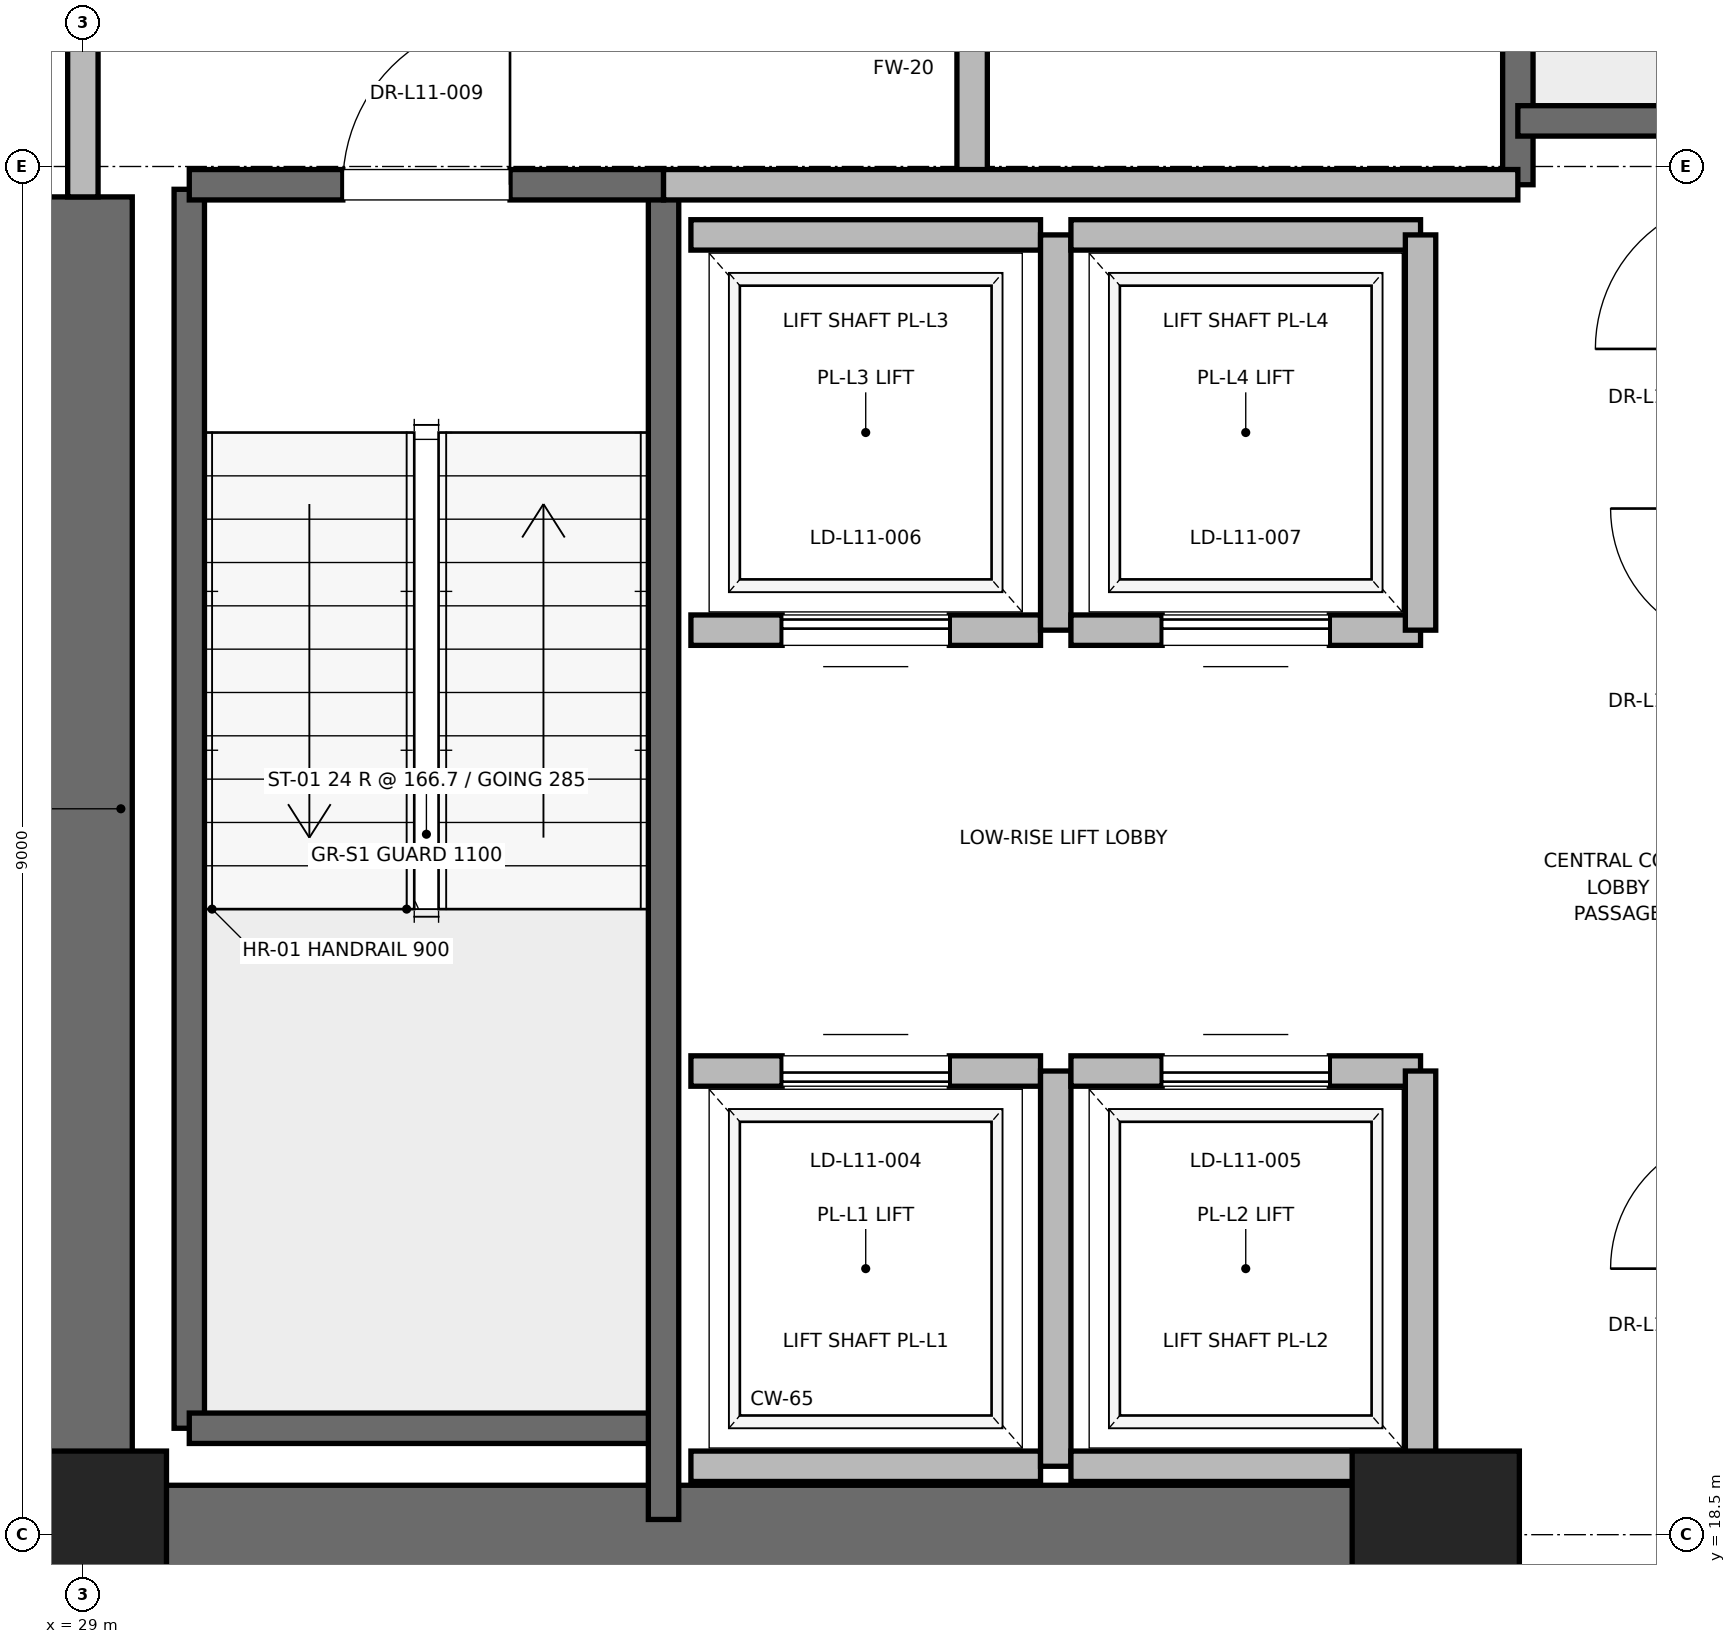
"""IFC4 building model, lengths in metres.
Left out: names, types, materials, properties, quantities, classifications, styles, units other than length and angle.
Written with IfcOpenShell. Run it as: python <this file> out.ifc"""

import sys

from ifc_helpers import new_model, si_unit, direction, frame, frame_2d, origin, origin_2d, place, context, subcontext, project, spatial, rectangle, extrude, element, fill, save


model = new_model("IFC4")
c1 = context("Model", 3, precision=1e-05, world=origin(), true_north=direction((0.0, 1.0)))
c2 = subcontext(c1, "Body", "Model", "MODEL_VIEW")
j1 = project(units=[si_unit("LENGTHUNIT", "METRE"), si_unit("PLANEANGLEUNIT", "RADIAN")], contexts=[c1])
p1 = place(None, origin())
s1 = spatial("IfcSite", under=j1, at=p1, CompositionType="ELEMENT")
p2 = place(p1, origin())
s2 = spatial("IfcBuilding", under=s1, at=p2, CompositionType="ELEMENT")
p3 = place(p2, frame((0.0, 0.0, 51.6)))
s3 = spatial("IfcBuildingStorey", under=s2, at=p3, CompositionType="ELEMENT", Elevation=51.6)
for number, where, z_axis, x_axis in (
    (1, (29.0, 18.5, 0.0), (0.0, 0.0, 1.0), (1.0, 0.0, 0.0)),
    (2, (37.9, 18.5, 0.0), (0.0, 0.0, 1.0), (1.0, 0.0, 0.0)),
):
    element("IfcColumn", number, at=place(p3, frame(where, z_axis=z_axis, x_axis=x_axis)), inside=s3, PredefinedType="PILASTER", context=c2, shape_type="SweptSolid", body=[
        extrude(rectangle(XDim=1.1, YDim=1.1, at=origin_2d()), origin(), (0.0, 0.0, 1.0), 4.0),
    ])
p4 = place(p3, frame((29.0, 18.5, 0.0), z_axis=(0.0, 0.0, 1.0), x_axis=(1.0, 0.0, 0.0)))
e3 = element("IfcWall", 3, at=p4, inside=s3, PredefinedType="SHEAR", context=c2, shape_type="SweptSolid", body=[
    extrude(rectangle(XDim=9.2, YDim=0.65, at=frame_2d((4.6, 0.0))), origin(), (0.0, 0.0, 1.0), 3.76),
])
p5 = place(p3, frame((29.0, 18.5, 0.0), z_axis=(0.0, 0.0, 1.0), x_axis=(0.0, 1.0, 0.0)))
e4 = element("IfcWall", 4, at=p5, inside=s3, PredefinedType="SHEAR", context=c2, shape_type="SweptSolid", body=[
    extrude(rectangle(XDim=8.8, YDim=0.65, at=frame_2d((4.4, 0.0))), origin(), (0.0, 0.0, 1.0), 3.76),
])
p6 = place(p3, frame((29.7, 19.2, 0.0), z_axis=(0.0, 0.0, 1.0), x_axis=(0.0, 1.0, 0.0)))
e5 = element("IfcWall", 5, at=p6, inside=s3, PredefinedType="SOLIDWALL", context=c2, shape_type="SweptSolid", body=[
    extrude(rectangle(XDim=8.15, YDim=0.2, at=frame_2d((4.075, 0.0))), origin(), (0.0, 0.0, 1.0), 3.76),
])
p7 = place(p3, frame((29.7, 19.2, 0.0), z_axis=(0.0, 0.0, 1.0), x_axis=(1.0, 0.0, 0.0)))
e6 = element("IfcWall", 6, at=p7, inside=s3, PredefinedType="SOLIDWALL", context=c2, shape_type="SweptSolid", body=[
    extrude(rectangle(XDim=3.12, YDim=0.2, at=frame_2d((1.56, 0.0))), origin(), (0.0, 0.0, 1.0), 3.76),
])
p8 = place(p3, frame((32.82, 18.6, 0.0), z_axis=(0.0, 0.0, 1.0), x_axis=(0.0, 1.0, 0.0)))
e7 = element("IfcWall", 7, at=p8, inside=s3, PredefinedType="SOLIDWALL", context=c2, shape_type="SweptSolid", body=[
    extrude(rectangle(XDim=8.78, YDim=0.2, at=frame_2d((4.39, 0.0))), origin(), (0.0, 0.0, 1.0), 3.76),
])
p9 = place(p3, frame((29.7, 27.38, 0.0), z_axis=(0.0, 0.0, 1.0), x_axis=(1.0, 0.0, 0.0)))
e8 = element("IfcWall", 8, at=p9, inside=s3, PredefinedType="SOLIDWALL", context=c2, shape_type="SweptSolid", body=[
    extrude(rectangle(XDim=3.12, YDim=0.2, at=frame_2d((1.56, 0.0))), origin(), (0.0, 0.0, 1.0), 3.76),
])
p10 = place(p9, frame((1.01, 0.0, 0.0)))
e9 = element("IfcOpeningElement", 9, at=p10, cuts=e8, PredefinedType="OPENING", context=c2, shape_type="SweptSolid", body=[
    extrude(rectangle(XDim=1.1, YDim=2.15, at=frame_2d((0.55, 1.075))), frame((0.0, 0.1, 0.0), z_axis=(0.0, -1.0, 0.0), x_axis=(1.0, 0.0, 0.0)), (0.0, 0.0, 1.0), 0.2),
])
p11 = place(p3, frame((38.44, 27.38, 0.0), z_axis=(0.0, 0.0, 1.0), x_axis=(0.0, 1.0, 0.0)))
e10 = element("IfcWall", 10, at=p11, inside=s3, PredefinedType="SOLIDWALL", context=c2, shape_type="SweptSolid", body=[
    extrude(rectangle(XDim=8.87, YDim=0.2, at=frame_2d((4.435, 0.0))), origin(), (0.0, 0.0, 1.0), 3.76),
])
p12 = place(p3, frame((38.44, 27.8, 0.0), z_axis=(0.0, 0.0, 1.0), x_axis=(1.0, 0.0, 0.0)))
e11 = element("IfcWall", 11, at=p12, inside=s3, PredefinedType="SOLIDWALL", context=c2, shape_type="SweptSolid", body=[
    extrude(rectangle(XDim=3.32, YDim=0.2, at=frame_2d((1.66, 0.0))), origin(), (0.0, 0.0, 1.0), 3.76),
])
p13 = place(p3, frame((34.85, 27.38, 0.0), z_axis=(0.0, 0.0, 1.0), x_axis=(0.0, 1.0, 0.0)))
e12 = element("IfcWall", 12, at=p13, inside=s3, PredefinedType="PARTITIONING", context=c2, shape_type="SweptSolid", body=[
    extrude(rectangle(XDim=3.37, YDim=0.2, at=frame_2d((1.685, 0.0))), origin(), (0.0, 0.0, 1.0), 3.76),
])
p14 = place(p13, frame((1.11, 0.0, 0.0)))
e13 = element("IfcOpeningElement", 13, at=p14, cuts=e12, PredefinedType="OPENING", context=c2, shape_type="SweptSolid", body=[
    extrude(rectangle(XDim=1.15, YDim=2.2, at=frame_2d((0.575, 1.1))), frame((0.0, 0.1, 0.0), z_axis=(0.0, -1.0, 0.0), x_axis=(1.0, 0.0, 0.0)), (0.0, 0.0, 1.0), 0.2),
])
p15 = place(p3, frame((29.0, 27.3, 0.0), z_axis=(0.0, 0.0, 1.0), x_axis=(0.0, 1.0, 0.0)))
e14 = element("IfcWall", 14, at=p15, inside=s3, PredefinedType="PARTITIONING", context=c2, shape_type="SweptSolid", body=[
    extrude(rectangle(XDim=3.4, YDim=0.2, at=frame_2d((1.7, 0.0))), origin(), (0.0, 0.0, 1.0), 2.54),
])
p16 = place(p15, frame((1.125, 0.0, 0.0)))
e15 = element("IfcOpeningElement", 15, at=p16, cuts=e14, PredefinedType="OPENING", context=c2, shape_type="SweptSolid", body=[
    extrude(rectangle(XDim=1.15, YDim=2.2, at=frame_2d((0.575, 1.1))), frame((0.0, 0.1, 0.0), z_axis=(0.0, -1.0, 0.0), x_axis=(1.0, 0.0, 0.0)), (0.0, 0.0, 1.0), 0.2),
])
p17 = place(p3, frame((32.82, 27.38, 0.0), z_axis=(0.0, 0.0, 1.0), x_axis=(1.0, 0.0, 0.0)))
e16 = element("IfcWall", 16, at=p17, inside=s3, PredefinedType="PARTITIONING", context=c2, shape_type="SweptSolid", body=[
    extrude(rectangle(XDim=5.62, YDim=0.2, at=frame_2d((2.81, 0.0))), origin(), (0.0, 0.0, 1.0), 3.76),
])
p18 = place(p3, frame((33.0, 18.95, 0.0), z_axis=(0.0, 0.0, 1.0), x_axis=(1.0, 0.0, 0.0)))
e17 = element("IfcWall", 17, at=p18, inside=s3, PredefinedType="SOLIDWALL", context=c2, shape_type="SweptSolid", body=[
    extrude(rectangle(XDim=2.3, YDim=0.2, at=frame_2d((1.15, 0.0))), origin(), (0.0, 0.0, 1.0), 3.76),
])
p19 = place(p3, frame((35.3, 21.55, 0.0), z_axis=(0.0, 0.0, 1.0), x_axis=(-1.0, 0.0, 0.0)))
e18 = element("IfcWall", 18, at=p19, inside=s3, PredefinedType="SOLIDWALL", context=c2, shape_type="SweptSolid", body=[
    extrude(rectangle(XDim=2.3, YDim=0.2, at=frame_2d((1.15, 0.0))), origin(), (0.0, 0.0, 1.0), 3.76),
])
p20 = place(p19, frame((0.6, 0.0, 0.0)))
e19 = element("IfcOpeningElement", 19, at=p20, cuts=e18, PredefinedType="OPENING", context=c2, shape_type="SweptSolid", body=[
    extrude(rectangle(XDim=1.1, YDim=2.2, at=frame_2d((0.55, 1.1))), frame((0.0, 0.1, 0.0), z_axis=(0.0, -1.0, 0.0), x_axis=(1.0, 0.0, 0.0)), (0.0, 0.0, 1.0), 0.2),
])
p21 = place(p3, frame((35.4, 18.95, 0.0), z_axis=(0.0, 0.0, 1.0), x_axis=(0.0, 1.0, 0.0)))
e20 = element("IfcWall", 20, at=p21, inside=s3, PredefinedType="SOLIDWALL", context=c2, shape_type="SweptSolid", body=[
    extrude(rectangle(XDim=2.6, YDim=0.2, at=frame_2d((1.3, 0.0))), origin(), (0.0, 0.0, 1.0), 3.76),
])
p22 = place(p3, frame((35.5, 18.95, 0.0), z_axis=(0.0, 0.0, 1.0), x_axis=(1.0, 0.0, 0.0)))
e21 = element("IfcWall", 21, at=p22, inside=s3, PredefinedType="SOLIDWALL", context=c2, shape_type="SweptSolid", body=[
    extrude(rectangle(XDim=2.3, YDim=0.2, at=frame_2d((1.15, 0.0))), origin(), (0.0, 0.0, 1.0), 2.54),
])
p23 = place(p3, frame((37.8, 21.55, 0.0), z_axis=(0.0, 0.0, 1.0), x_axis=(-1.0, 0.0, 0.0)))
e22 = element("IfcWall", 22, at=p23, inside=s3, PredefinedType="SOLIDWALL", context=c2, shape_type="SweptSolid", body=[
    extrude(rectangle(XDim=2.3, YDim=0.2, at=frame_2d((1.15, 0.0))), origin(), (0.0, 0.0, 1.0), 3.76),
])
p24 = place(p23, frame((0.6, 0.0, 0.0)))
e23 = element("IfcOpeningElement", 23, at=p24, cuts=e22, PredefinedType="OPENING", context=c2, shape_type="SweptSolid", body=[
    extrude(rectangle(XDim=1.1, YDim=2.2, at=frame_2d((0.55, 1.1))), frame((0.0, 0.1, 0.0), z_axis=(0.0, -1.0, 0.0), x_axis=(1.0, 0.0, 0.0)), (0.0, 0.0, 1.0), 0.2),
])
p25 = place(p3, frame((37.8, 18.95, 0.0), z_axis=(0.0, 0.0, 1.0), x_axis=(0.0, 1.0, 0.0)))
e24 = element("IfcWall", 24, at=p25, inside=s3, PredefinedType="SOLIDWALL", context=c2, shape_type="SweptSolid", body=[
    extrude(rectangle(XDim=2.6, YDim=0.2, at=frame_2d((1.3, 0.0))), origin(), (0.0, 0.0, 1.0), 2.54),
])
p26 = place(p3, frame((33.0, 24.45, 0.0), z_axis=(0.0, 0.0, 1.0), x_axis=(1.0, 0.0, 0.0)))
e25 = element("IfcWall", 25, at=p26, inside=s3, PredefinedType="SOLIDWALL", context=c2, shape_type="SweptSolid", body=[
    extrude(rectangle(XDim=2.3, YDim=0.2, at=frame_2d((1.15, 0.0))), origin(), (0.0, 0.0, 1.0), 3.76),
])
p27 = place(p26, frame((0.6, 0.0, 0.0)))
e26 = element("IfcOpeningElement", 26, at=p27, cuts=e25, PredefinedType="OPENING", context=c2, shape_type="SweptSolid", body=[
    extrude(rectangle(XDim=1.1, YDim=2.2, at=frame_2d((0.55, 1.1))), frame((0.0, 0.1, 0.0), z_axis=(0.0, -1.0, 0.0), x_axis=(1.0, 0.0, 0.0)), (0.0, 0.0, 1.0), 0.2),
])
p28 = place(p3, frame((35.3, 27.05, 0.0), z_axis=(0.0, 0.0, 1.0), x_axis=(-1.0, 0.0, 0.0)))
e27 = element("IfcWall", 27, at=p28, inside=s3, PredefinedType="SOLIDWALL", context=c2, shape_type="SweptSolid", body=[
    extrude(rectangle(XDim=2.3, YDim=0.2, at=frame_2d((1.15, 0.0))), origin(), (0.0, 0.0, 1.0), 3.76),
])
p29 = place(p3, frame((35.4, 24.45, 0.0), z_axis=(0.0, 0.0, 1.0), x_axis=(0.0, 1.0, 0.0)))
e28 = element("IfcWall", 28, at=p29, inside=s3, PredefinedType="SOLIDWALL", context=c2, shape_type="SweptSolid", body=[
    extrude(rectangle(XDim=2.6, YDim=0.2, at=frame_2d((1.3, 0.0))), origin(), (0.0, 0.0, 1.0), 3.76),
])
p30 = place(p3, frame((35.5, 24.45, 0.0), z_axis=(0.0, 0.0, 1.0), x_axis=(1.0, 0.0, 0.0)))
e29 = element("IfcWall", 29, at=p30, inside=s3, PredefinedType="SOLIDWALL", context=c2, shape_type="SweptSolid", body=[
    extrude(rectangle(XDim=2.3, YDim=0.2, at=frame_2d((1.15, 0.0))), origin(), (0.0, 0.0, 1.0), 3.76),
])
p31 = place(p30, frame((0.6, 0.0, 0.0)))
e30 = element("IfcOpeningElement", 30, at=p31, cuts=e29, PredefinedType="OPENING", context=c2, shape_type="SweptSolid", body=[
    extrude(rectangle(XDim=1.1, YDim=2.2, at=frame_2d((0.55, 1.1))), frame((0.0, 0.1, 0.0), z_axis=(0.0, -1.0, 0.0), x_axis=(1.0, 0.0, 0.0)), (0.0, 0.0, 1.0), 0.2),
])
p32 = place(p3, frame((37.8, 27.05, 0.0), z_axis=(0.0, 0.0, 1.0), x_axis=(-1.0, 0.0, 0.0)))
e31 = element("IfcWall", 31, at=p32, inside=s3, PredefinedType="SOLIDWALL", context=c2, shape_type="SweptSolid", body=[
    extrude(rectangle(XDim=2.3, YDim=0.2, at=frame_2d((1.15, 0.0))), origin(), (0.0, 0.0, 1.0), 3.76),
])
p33 = place(p3, frame((37.8, 24.45, 0.0), z_axis=(0.0, 0.0, 1.0), x_axis=(0.0, 1.0, 0.0)))
e32 = element("IfcWall", 32, at=p33, inside=s3, PredefinedType="SOLIDWALL", context=c2, shape_type="SweptSolid", body=[
    extrude(rectangle(XDim=2.6, YDim=0.2, at=frame_2d((1.3, 0.0))), origin(), (0.0, 0.0, 1.0), 3.76),
])
p34 = place(p10, origin())
e33 = element("IfcDoor", 33, at=p34, inside=s3, OperationType="SINGLE_SWING_RIGHT", PredefinedType="DOOR", context=c2, shape_type="SweptSolid", body=[
    extrude(rectangle(XDim=1.1, YDim=2.15, at=frame_2d((0.55, 1.075))), frame((0.0, 0.025, 0.0), z_axis=(0.0, -1.0, 0.0), x_axis=(1.0, 0.0, 0.0)), (0.0, 0.0, 1.0), 0.05),
])
fill(e9, e33)
p35 = place(p20, origin())
e34 = element("IfcDoor", 34, at=p35, inside=s3, OperationType="SLIDING_TO_RIGHT", PredefinedType="DOOR", context=c2, shape_type="SweptSolid", body=[
    extrude(rectangle(XDim=1.1, YDim=2.2, at=frame_2d((0.55, 1.1))), frame((0.0, 0.025, 0.0), z_axis=(0.0, -1.0, 0.0), x_axis=(1.0, 0.0, 0.0)), (0.0, 0.0, 1.0), 0.05),
])
fill(e19, e34)
p36 = place(p24, origin())
e35 = element("IfcDoor", 35, at=p36, inside=s3, OperationType="SLIDING_TO_RIGHT", PredefinedType="DOOR", context=c2, shape_type="SweptSolid", body=[
    extrude(rectangle(XDim=1.1, YDim=2.2, at=frame_2d((0.55, 1.1))), frame((0.0, 0.025, 0.0), z_axis=(0.0, -1.0, 0.0), x_axis=(1.0, 0.0, 0.0)), (0.0, 0.0, 1.0), 0.05),
])
fill(e23, e35)
p37 = place(p27, origin())
e36 = element("IfcDoor", 36, at=p37, inside=s3, OperationType="SLIDING_TO_RIGHT", PredefinedType="DOOR", context=c2, shape_type="SweptSolid", body=[
    extrude(rectangle(XDim=1.1, YDim=2.2, at=frame_2d((0.55, 1.1))), frame((0.0, 0.025, 0.0), z_axis=(0.0, -1.0, 0.0), x_axis=(1.0, 0.0, 0.0)), (0.0, 0.0, 1.0), 0.05),
])
fill(e26, e36)
p38 = place(p31, origin())
e37 = element("IfcDoor", 37, at=p38, inside=s3, OperationType="SLIDING_TO_RIGHT", PredefinedType="DOOR", context=c2, shape_type="SweptSolid", body=[
    extrude(rectangle(XDim=1.1, YDim=2.2, at=frame_2d((0.55, 1.1))), frame((0.0, 0.025, 0.0), z_axis=(0.0, -1.0, 0.0), x_axis=(1.0, 0.0, 0.0)), (0.0, 0.0, 1.0), 0.05),
])
fill(e30, e37)
save(model, sys.argv[1])
